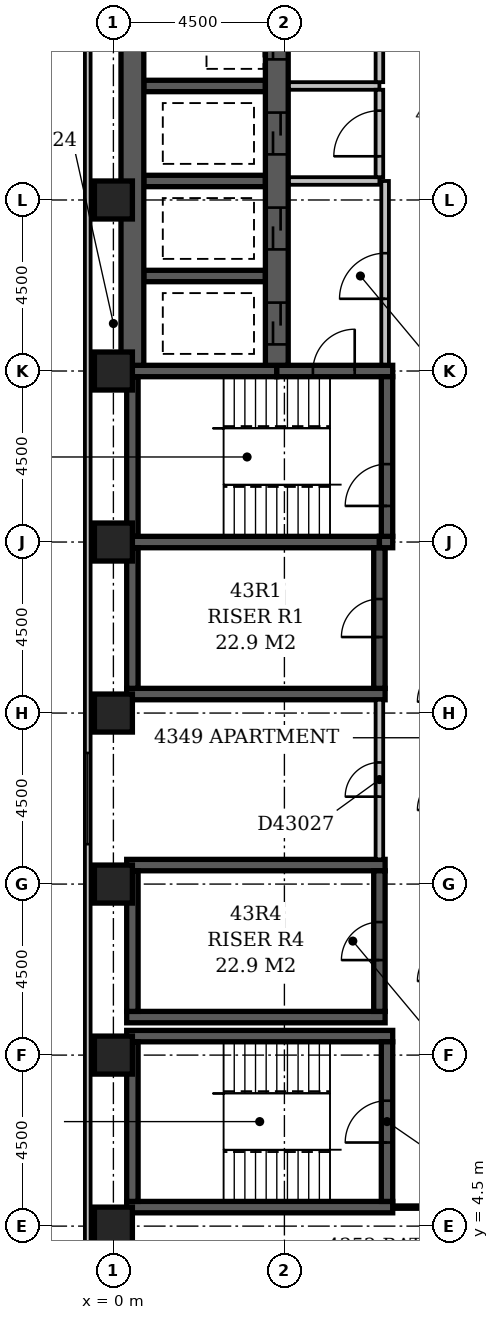
"""IFC4 building model, lengths in metres.
Left out: names, types, materials, properties, quantities, classifications, styles, units other than length and angle.
Written with IfcOpenShell. Run it as: python <this file> out.ifc"""

import sys

from ifc_helpers import new_model, si_unit, direction, frame, frame_2d, origin, origin_2d, place, context, subcontext, project, spatial, rectangle, extrude, element, fill, save


model = new_model("IFC4")
c1 = context("Model", 3, precision=1e-05, world=origin(), true_north=direction((0.0, 1.0)))
c2 = subcontext(c1, "Body", "Model", "MODEL_VIEW")
j1 = project(units=[si_unit("LENGTHUNIT", "METRE"), si_unit("PLANEANGLEUNIT", "RADIAN")], contexts=[c1])
p1 = place(None, origin())
s1 = spatial("IfcSite", under=j1, at=p1, CompositionType="ELEMENT")
p2 = place(p1, origin())
s2 = spatial("IfcBuilding", under=s1, at=p2, CompositionType="ELEMENT")
p3 = place(p2, frame((0.0, 0.0, 170.0)))
s3 = spatial("IfcBuildingStorey", under=s2, at=p3, CompositionType="ELEMENT", Elevation=170.0)
for number, where, z_axis, x_axis in (
    (1, (0.35, 5.0, -0.3), (0.0, 0.0, 1.0), (1.0, 0.0, 0.0)),
    (2, (0.35, 9.5, -0.3), (0.0, 0.0, 1.0), (1.0, 0.0, 0.0)),
):
    element("IfcWall", number, at=place(p3, frame(where, z_axis=z_axis, x_axis=x_axis)), inside=s3, PredefinedType="SHEAR", context=c2, shape_type="SweptSolid", body=[
        extrude(rectangle(XDim=7.0, YDim=0.3, at=frame_2d((3.5, 0.0))), origin(), (0.0, 0.0, 1.0), 3.45),
    ])
for number, where, z_axis, x_axis in (
    (3, (0.35, 10.0, -0.3), (0.0, 0.0, 1.0), (1.0, 0.0, 0.0)),
    (4, (0.35, 14.0, -0.3), (0.0, 0.0, 1.0), (1.0, 0.0, 0.0)),
    (5, (0.35, 18.5, -0.3), (0.0, 0.0, 1.0), (1.0, 0.0, 0.0)),
):
    element("IfcWall", number, at=place(p3, frame(where, z_axis=z_axis, x_axis=x_axis)), inside=s3, PredefinedType="SHEAR", context=c2, shape_type="SweptSolid", body=[
        extrude(rectangle(XDim=6.8, YDim=0.3, at=frame_2d((3.4, 0.0))), origin(), (0.0, 0.0, 1.0), 3.45),
    ])
p4 = place(p3, frame((0.35, 22.5, -0.3), z_axis=(0.0, 0.0, 1.0), x_axis=(1.0, 0.0, 0.0)))
e6 = element("IfcWall", 6, at=p4, inside=s3, PredefinedType="SHEAR", context=c2, shape_type="SweptSolid", body=[
    extrude(rectangle(XDim=6.65, YDim=0.3, at=frame_2d((3.325, 0.0))), origin(), (0.0, 0.0, 1.0), 3.45),
])
p5 = place(p3, frame((0.35, 27.0, -0.3), z_axis=(0.0, 0.0, 1.0), x_axis=(1.0, 0.0, 0.0)))
e7 = element("IfcWall", 7, at=p5, inside=s3, PredefinedType="SHEAR", context=c2, shape_type="SweptSolid", body=[
    extrude(rectangle(XDim=3.95, YDim=0.3, at=frame_2d((1.975, 0.0))), origin(), (0.0, 0.0, 1.0), 3.45),
])
p6 = place(p3, frame((0.5, 5.15, -0.3), z_axis=(0.0, 0.0, 1.0), x_axis=(0.0, 1.0, 0.0)))
e8 = element("IfcWall", 8, at=p6, inside=s3, PredefinedType="SHEAR", context=c2, shape_type="SweptSolid", body=[
    extrude(rectangle(XDim=4.2, YDim=0.3, at=frame_2d((2.1, 0.0))), origin(), (0.0, 0.0, 1.0), 3.45),
])
for number, where, z_axis, x_axis in (
    (9, (0.5, 10.15, -0.3), (0.0, 0.0, 1.0), (0.0, 1.0, 0.0)),
    (10, (0.5, 18.65, -0.3), (0.0, 0.0, 1.0), (0.0, 1.0, 0.0)),
):
    element("IfcWall", number, at=place(p3, frame(where, z_axis=z_axis, x_axis=x_axis)), inside=s3, PredefinedType="SHEAR", context=c2, shape_type="SweptSolid", body=[
        extrude(rectangle(XDim=3.7, YDim=0.3, at=frame_2d((1.85, 0.0))), origin(), (0.0, 0.0, 1.0), 3.45),
    ])
p7 = place(p3, frame((0.5, 22.65, -0.3), z_axis=(0.0, 0.0, 1.0), x_axis=(0.0, 1.0, 0.0)))
e11 = element("IfcWall", 11, at=p7, inside=s3, PredefinedType="SHEAR", context=c2, shape_type="SweptSolid", body=[
    extrude(rectangle(XDim=4.2, YDim=0.3, at=frame_2d((2.1, 0.0))), origin(), (0.0, 0.0, 1.0), 3.45),
])
p8 = place(p3, frame((0.5, 27.15, -0.3), z_axis=(0.0, 0.0, 1.0), x_axis=(0.0, 1.0, 0.0)))
e12 = element("IfcWall", 12, at=p8, inside=s3, PredefinedType="SHEAR", context=c2, shape_type="SweptSolid", body=[
    extrude(rectangle(XDim=22.05, YDim=0.6, at=frame_2d((11.025, 0.0))), origin(), (0.0, 0.0, 1.0), 3.45),
])
for number, where, z_axis, x_axis in (
    (13, (0.8, 29.5, -0.3), (0.0, 0.0, 1.0), (1.0, 0.0, 0.0)),
    (14, (0.8, 32.0, -0.3), (0.0, 0.0, 1.0), (1.0, 0.0, 0.0)),
    (15, (0.8, 34.5, -0.3), (0.0, 0.0, 1.0), (1.0, 0.0, 0.0)),
):
    element("IfcWall", number, at=place(p3, frame(where, z_axis=z_axis, x_axis=x_axis)), inside=s3, PredefinedType="SHEAR", context=c2, shape_type="SweptSolid", body=[
        extrude(rectangle(XDim=3.2, YDim=0.3, at=frame_2d((1.6, 0.0))), origin(), (0.0, 0.0, 1.0), 3.45),
    ])
p9 = place(p3, frame((4.3, 27.0, -0.3), z_axis=(0.0, 0.0, 1.0), x_axis=(1.0, 0.0, 0.0)))
e16 = element("IfcWall", 16, at=p9, inside=s3, PredefinedType="SHEAR", context=c2, shape_type="SweptSolid", body=[
    extrude(rectangle(XDim=3.05, YDim=0.3, at=frame_2d((1.525, 0.0))), origin(), (0.0, 0.0, 1.0), 3.45),
])
p10 = place(p9, frame((0.95, 0.0, 0.3)))
e17 = element("IfcOpeningElement", 17, at=p10, cuts=e16, PredefinedType="OPENING", context=c2, shape_type="SweptSolid", body=[
    extrude(rectangle(XDim=1.1, YDim=2.1, at=frame_2d((0.55, 1.05))), frame((0.0, 0.162, 0.0), z_axis=(0.0, -1.0, 0.0), x_axis=(1.0, 0.0, 0.0)), (0.0, 0.0, 1.0), 0.324),
])
p11 = place(p3, frame((4.3, 27.15, -0.3), z_axis=(0.0, 0.0, 1.0), x_axis=(0.0, 1.0, 0.0)))
e18 = element("IfcWall", 18, at=p11, inside=s3, PredefinedType="SHEAR", context=c2, shape_type="SweptSolid", body=[
    extrude(rectangle(XDim=22.05, YDim=0.6, at=frame_2d((11.025, 0.0))), origin(), (0.0, 0.0, 1.0), 3.45),
])
p12 = place(p11, frame((3.05, 0.0, 0.3)))
e19 = element("IfcOpeningElement", 19, at=p12, cuts=e18, PredefinedType="OPENING", context=c2, shape_type="SweptSolid", body=[
    extrude(rectangle(XDim=1.1, YDim=2.1, at=frame_2d((0.55, 1.05))), frame((0.0, 0.312, 0.0), z_axis=(0.0, -1.0, 0.0), x_axis=(1.0, 0.0, 0.0)), (0.0, 0.0, 1.0), 0.624),
])
p13 = place(p11, frame((0.55, 0.0, 0.3)))
e20 = element("IfcOpeningElement", 20, at=p13, cuts=e18, PredefinedType="OPENING", context=c2, shape_type="SweptSolid", body=[
    extrude(rectangle(XDim=1.1, YDim=2.1, at=frame_2d((0.55, 1.05))), frame((0.0, 0.312, 0.0), z_axis=(0.0, -1.0, 0.0), x_axis=(1.0, 0.0, 0.0)), (0.0, 0.0, 1.0), 0.624),
])
p14 = place(p11, frame((20.55, 0.0, 0.3)))
e21 = element("IfcOpeningElement", 21, at=p14, cuts=e18, PredefinedType="OPENING", context=c2, shape_type="SweptSolid", body=[
    extrude(rectangle(XDim=1.1, YDim=2.1, at=frame_2d((0.55, 1.05))), frame((0.0, 0.312, 0.0), z_axis=(0.0, -1.0, 0.0), x_axis=(1.0, 0.0, 0.0)), (0.0, 0.0, 1.0), 0.624),
])
p15 = place(p11, frame((18.05, 0.0, 0.3)))
e22 = element("IfcOpeningElement", 22, at=p15, cuts=e18, PredefinedType="OPENING", context=c2, shape_type="SweptSolid", body=[
    extrude(rectangle(XDim=1.1, YDim=2.1, at=frame_2d((0.55, 1.05))), frame((0.0, 0.312, 0.0), z_axis=(0.0, -1.0, 0.0), x_axis=(1.0, 0.0, 0.0)), (0.0, 0.0, 1.0), 0.624),
])
p16 = place(p11, frame((15.55, 0.0, 0.3)))
e23 = element("IfcOpeningElement", 23, at=p16, cuts=e18, PredefinedType="OPENING", context=c2, shape_type="SweptSolid", body=[
    extrude(rectangle(XDim=1.1, YDim=2.1, at=frame_2d((0.55, 1.05))), frame((0.0, 0.312, 0.0), z_axis=(0.0, -1.0, 0.0), x_axis=(1.0, 0.0, 0.0)), (0.0, 0.0, 1.0), 0.624),
])
p17 = place(p11, frame((13.05, 0.0, 0.3)))
e24 = element("IfcOpeningElement", 24, at=p17, cuts=e18, PredefinedType="OPENING", context=c2, shape_type="SweptSolid", body=[
    extrude(rectangle(XDim=1.1, YDim=2.1, at=frame_2d((0.55, 1.05))), frame((0.0, 0.312, 0.0), z_axis=(0.0, -1.0, 0.0), x_axis=(1.0, 0.0, 0.0)), (0.0, 0.0, 1.0), 0.624),
])
p18 = place(p11, frame((10.55, 0.0, 0.3)))
e25 = element("IfcOpeningElement", 25, at=p18, cuts=e18, PredefinedType="OPENING", context=c2, shape_type="SweptSolid", body=[
    extrude(rectangle(XDim=1.1, YDim=2.1, at=frame_2d((0.55, 1.05))), frame((0.0, 0.312, 0.0), z_axis=(0.0, -1.0, 0.0), x_axis=(1.0, 0.0, 0.0)), (0.0, 0.0, 1.0), 0.624),
])
p19 = place(p11, frame((8.05, 0.0, 0.3)))
e26 = element("IfcOpeningElement", 26, at=p19, cuts=e18, PredefinedType="OPENING", context=c2, shape_type="SweptSolid", body=[
    extrude(rectangle(XDim=1.1, YDim=2.1, at=frame_2d((0.55, 1.05))), frame((0.0, 0.312, 0.0), z_axis=(0.0, -1.0, 0.0), x_axis=(1.0, 0.0, 0.0)), (0.0, 0.0, 1.0), 0.624),
])
p20 = place(p11, frame((5.55, 0.0, 0.3)))
e27 = element("IfcOpeningElement", 27, at=p20, cuts=e18, PredefinedType="OPENING", context=c2, shape_type="SweptSolid", body=[
    extrude(rectangle(XDim=1.1, YDim=2.1, at=frame_2d((0.55, 1.05))), frame((0.0, 0.312, 0.0), z_axis=(0.0, -1.0, 0.0), x_axis=(1.0, 0.0, 0.0)), (0.0, 0.0, 1.0), 0.624),
])
p21 = place(p3, frame((7.0, 10.15, -0.3), z_axis=(0.0, 0.0, 1.0), x_axis=(0.0, 1.0, 0.0)))
e28 = element("IfcWall", 28, at=p21, inside=s3, PredefinedType="SHEAR", context=c2, shape_type="SweptSolid", body=[
    extrude(rectangle(XDim=3.7, YDim=0.3, at=frame_2d((1.85, 0.0))), origin(), (0.0, 0.0, 1.0), 3.45),
])
p22 = place(p21, frame((1.35, 0.0, 0.3)))
e29 = element("IfcOpeningElement", 29, at=p22, cuts=e28, PredefinedType="OPENING", context=c2, shape_type="SweptSolid", body=[
    extrude(rectangle(XDim=1.0, YDim=2.1, at=frame_2d((0.5, 1.05))), frame((0.0, 0.162, 0.0), z_axis=(0.0, -1.0, 0.0), x_axis=(1.0, 0.0, 0.0)), (0.0, 0.0, 1.0), 0.324),
])
p23 = place(p3, frame((7.0, 18.65, -0.3), z_axis=(0.0, 0.0, 1.0), x_axis=(0.0, 1.0, 0.0)))
e30 = element("IfcWall", 30, at=p23, inside=s3, PredefinedType="SHEAR", context=c2, shape_type="SweptSolid", body=[
    extrude(rectangle(XDim=3.7, YDim=0.3, at=frame_2d((1.85, 0.0))), origin(), (0.0, 0.0, 1.0), 3.45),
])
p24 = place(p23, frame((1.35, 0.0, 0.3)))
e31 = element("IfcOpeningElement", 31, at=p24, cuts=e30, PredefinedType="OPENING", context=c2, shape_type="SweptSolid", body=[
    extrude(rectangle(XDim=1.0, YDim=2.1, at=frame_2d((0.5, 1.05))), frame((0.0, 0.162, 0.0), z_axis=(0.0, -1.0, 0.0), x_axis=(1.0, 0.0, 0.0)), (0.0, 0.0, 1.0), 0.324),
])
p25 = place(p3, frame((7.0, 22.5, -0.3), z_axis=(0.0, 0.0, 1.0), x_axis=(1.0, 0.0, 0.0)))
e32 = element("IfcWall", 32, at=p25, inside=s3, PredefinedType="SHEAR", context=c2, shape_type="SweptSolid", body=[
    extrude(rectangle(XDim=0.35, YDim=0.3, at=frame_2d((0.175, 0.0))), origin(), (0.0, 0.0, 1.0), 3.45),
])
p26 = place(p3, frame((7.2, 5.15, -0.3), z_axis=(0.0, 0.0, 1.0), x_axis=(0.0, 1.0, 0.0)))
e33 = element("IfcWall", 33, at=p26, inside=s3, PredefinedType="SHEAR", context=c2, shape_type="SweptSolid", body=[
    extrude(rectangle(XDim=4.2, YDim=0.3, at=frame_2d((2.1, 0.0))), origin(), (0.0, 0.0, 1.0), 3.45),
])
p27 = place(p26, frame((1.55, 0.0, 0.3)))
e34 = element("IfcOpeningElement", 34, at=p27, cuts=e33, PredefinedType="OPENING", context=c2, shape_type="SweptSolid", body=[
    extrude(rectangle(XDim=1.1, YDim=2.1, at=frame_2d((0.55, 1.05))), frame((0.0, 0.162, 0.0), z_axis=(0.0, -1.0, 0.0), x_axis=(1.0, 0.0, 0.0)), (0.0, 0.0, 1.0), 0.324),
])
p28 = place(p3, frame((7.2, 22.65, -0.3), z_axis=(0.0, 0.0, 1.0), x_axis=(0.0, 1.0, 0.0)))
e35 = element("IfcWall", 35, at=p28, inside=s3, PredefinedType="SHEAR", context=c2, shape_type="SweptSolid", body=[
    extrude(rectangle(XDim=4.2, YDim=0.3, at=frame_2d((2.1, 0.0))), origin(), (0.0, 0.0, 1.0), 3.45),
])
p29 = place(p28, frame((0.8, 0.0, 0.3)))
e36 = element("IfcOpeningElement", 36, at=p29, cuts=e35, PredefinedType="OPENING", context=c2, shape_type="SweptSolid", body=[
    extrude(rectangle(XDim=1.1, YDim=2.1, at=frame_2d((0.55, 1.05))), frame((0.0, 0.162, 0.0), z_axis=(0.0, -1.0, 0.0), x_axis=(1.0, 0.0, 0.0)), (0.0, 0.0, 1.0), 0.324),
])
for number, where, z_axis, x_axis in (
    (37, (0.0, 4.5, -0.3), (0.0, 0.0, 1.0), (1.0, 0.0, 0.0)),
    (38, (0.0, 9.0, -0.3), (0.0, 0.0, 1.0), (1.0, 0.0, 0.0)),
    (39, (0.0, 13.5, -0.3), (0.0, 0.0, 1.0), (1.0, 0.0, 0.0)),
    (40, (0.0, 18.0, -0.3), (0.0, 0.0, 1.0), (1.0, 0.0, 0.0)),
    (41, (0.0, 22.5, -0.3), (0.0, 0.0, 1.0), (1.0, 0.0, 0.0)),
    (42, (0.0, 27.0, -0.3), (0.0, 0.0, 1.0), (1.0, 0.0, 0.0)),
    (43, (0.0, 31.5, -0.3), (0.0, 0.0, 1.0), (1.0, 0.0, 0.0)),
):
    element("IfcColumn", number, at=place(p3, frame(where, z_axis=z_axis, x_axis=x_axis)), inside=s3, PredefinedType="COLUMN", context=c2, shape_type="SweptSolid", body=[
        extrude(rectangle(XDim=1.0, YDim=1.0, at=origin_2d()), origin(), (0.0, 0.0, 1.0), 3.45),
    ])
p30 = place(p3, frame((-0.675, 59.1, 0.0), z_axis=(0.0, 0.0, 1.0), x_axis=(0.0, -1.0, 0.0)))
e44 = element("IfcWall", 44, at=p30, inside=s3, PredefinedType="STANDARD", context=c2, shape_type="SweptSolid", body=[
    extrude(rectangle(XDim=55.35, YDim=0.15, at=frame_2d((27.675, 0.0))), origin(), (0.0, 0.0, 1.0), 2.5),
])
p31 = place(p30, frame((42.15, 0.0, 0.6)))
e45 = element("IfcOpeningElement", 45, at=p31, cuts=e44, PredefinedType="OPENING", context=c2, shape_type="SweptSolid", body=[
    extrude(rectangle(XDim=2.4, YDim=1.8, at=frame_2d((1.2, 0.9))), frame((0.0, 0.087, 0.0), z_axis=(0.0, -1.0, 0.0), x_axis=(1.0, 0.0, 0.0)), (0.0, 0.0, 1.0), 0.174),
])
p32 = place(p3, frame((4.62, 34.5, 0.0), z_axis=(0.0, 0.0, 1.0), x_axis=(1.0, 0.0, 0.0)))
e46 = element("IfcWall", 46, at=p32, inside=s3, PredefinedType="PARTITIONING", context=c2, shape_type="SweptSolid", body=[
    extrude(rectangle(XDim=2.38, YDim=0.2, at=frame_2d((1.19, 0.0))), origin(), (0.0, 0.0, 1.0), 3.15),
])
p33 = place(p3, frame((7.0, 34.6, 0.0), z_axis=(0.0, 0.0, 1.0), x_axis=(0.0, 1.0, 0.0)))
e47 = element("IfcWall", 47, at=p33, inside=s3, PredefinedType="PARTITIONING", context=c2, shape_type="SweptSolid", body=[
    extrude(rectangle(XDim=14.9, YDim=0.2, at=frame_2d((7.45, 0.0))), origin(), (0.0, 0.0, 1.0), 3.15),
])
p34 = place(p33, frame((2.8, 0.0, 0.0)))
e48 = element("IfcOpeningElement", 48, at=p34, cuts=e47, PredefinedType="OPENING", context=c2, shape_type="SweptSolid", body=[
    extrude(rectangle(XDim=1.2, YDim=2.1, at=frame_2d((0.6, 1.05))), frame((0.0, 0.112, 0.0), z_axis=(0.0, -1.0, 0.0), x_axis=(1.0, 0.0, 0.0)), (0.0, 0.0, 1.0), 0.224),
])
p35 = place(p33, frame((9.8, 0.0, 0.0)))
e49 = element("IfcOpeningElement", 49, at=p35, cuts=e47, PredefinedType="OPENING", context=c2, shape_type="SweptSolid", body=[
    extrude(rectangle(XDim=1.2, YDim=2.1, at=frame_2d((0.6, 1.05))), frame((0.0, 0.112, 0.0), z_axis=(0.0, -1.0, 0.0), x_axis=(1.0, 0.0, 0.0)), (0.0, 0.0, 1.0), 0.224),
])
p36 = place(p3, frame((4.62, 32.0, 0.0), z_axis=(0.0, 0.0, 1.0), x_axis=(1.0, 0.0, 0.0)))
e50 = element("IfcWall", 50, at=p36, inside=s3, PredefinedType="PARTITIONING", context=c2, shape_type="SweptSolid", body=[
    extrude(rectangle(XDim=2.38, YDim=0.2, at=frame_2d((1.19, 0.0))), origin(), (0.0, 0.0, 1.0), 3.15),
])
p37 = place(p3, frame((7.0, 32.1, 0.0), z_axis=(0.0, 0.0, 1.0), x_axis=(0.0, 1.0, 0.0)))
e51 = element("IfcWall", 51, at=p37, inside=s3, PredefinedType="PARTITIONING", context=c2, shape_type="SweptSolid", body=[
    extrude(rectangle(XDim=2.3, YDim=0.2, at=frame_2d((1.15, 0.0))), origin(), (0.0, 0.0, 1.0), 3.15),
])
p38 = place(p37, frame((0.55, 0.0, 0.0)))
e52 = element("IfcOpeningElement", 52, at=p38, cuts=e51, PredefinedType="OPENING", context=c2, shape_type="SweptSolid", body=[
    extrude(rectangle(XDim=1.2, YDim=2.1, at=frame_2d((0.6, 1.05))), frame((0.0, 0.112, 0.0), z_axis=(0.0, -1.0, 0.0), x_axis=(1.0, 0.0, 0.0)), (0.0, 0.0, 1.0), 0.224),
])
p39 = place(p3, frame((7.15, 27.17, 0.0), z_axis=(0.0, 0.0, 1.0), x_axis=(0.0, 1.0, 0.0)))
e53 = element("IfcWall", 53, at=p39, inside=s3, PredefinedType="PARTITIONING", context=c2, shape_type="SweptSolid", body=[
    extrude(rectangle(XDim=4.83, YDim=0.2, at=frame_2d((2.415, 0.0))), origin(), (0.0, 0.0, 1.0), 3.15),
])
p40 = place(p39, frame((1.73, 0.0, 0.0)))
e54 = element("IfcOpeningElement", 54, at=p40, cuts=e53, PredefinedType="OPENING", context=c2, shape_type="SweptSolid", body=[
    extrude(rectangle(XDim=1.2, YDim=2.1, at=frame_2d((0.6, 1.05))), frame((0.0, 0.112, 0.0), z_axis=(0.0, -1.0, 0.0), x_axis=(1.0, 0.0, 0.0)), (0.0, 0.0, 1.0), 0.224),
])
p41 = place(p3, frame((0.0, 4.5, 0.0), z_axis=(0.0, 0.0, 1.0), x_axis=(0.0, 1.0, 0.0)))
e55 = element("IfcWall", 55, at=p41, inside=s3, PredefinedType="PARTITIONING", context=c2, shape_type="SweptSolid", body=[
    extrude(rectangle(XDim=0.5, YDim=0.1, at=frame_2d((0.25, 0.0))), origin(), (0.0, 0.0, 1.0), 2.5),
])
p42 = place(p3, frame((7.349, 5.0, 0.0), z_axis=(0.0, 0.0, 1.0), x_axis=(1.0, 0.0, 0.0)))
e56 = element("IfcWall", 56, at=p42, inside=s3, PredefinedType="PARTITIONING", context=c2, shape_type="SweptSolid", body=[
    extrude(rectangle(XDim=1.551, YDim=0.1, at=frame_2d((0.775, 0.0))), origin(), (0.0, 0.0, 1.0), 3.15),
])
p43 = place(p3, frame((7.0, 14.15, 0.0), z_axis=(0.0, 0.0, 1.0), x_axis=(0.0, 1.0, 0.0)))
e57 = element("IfcWall", 57, at=p43, inside=s3, PredefinedType="PARTITIONING", context=c2, shape_type="SweptSolid", body=[
    extrude(rectangle(XDim=4.2, YDim=0.2, at=frame_2d((2.1, 0.0))), origin(), (0.0, 0.0, 1.0), 3.15),
])
p44 = place(p43, frame((1.65, 0.0, 0.0)))
e58 = element("IfcOpeningElement", 58, at=p44, cuts=e57, PredefinedType="OPENING", context=c2, shape_type="SweptSolid", body=[
    extrude(rectangle(XDim=0.9, YDim=2.1, at=frame_2d((0.45, 1.05))), frame((0.0, 0.112, 0.0), z_axis=(0.0, -1.0, 0.0), x_axis=(1.0, 0.0, 0.0)), (0.0, 0.0, 1.0), 0.224),
])
p45 = place(p31, origin())
e59 = element("IfcWindow", 59, at=p45, inside=s3, PartitioningType="SINGLE_PANEL", PredefinedType="WINDOW", context=c2, shape_type="SweptSolid", body=[
    extrude(rectangle(XDim=2.4, YDim=1.8, at=frame_2d((1.2, 0.9))), frame((0.0, 0.03, 0.0), z_axis=(0.0, -1.0, 0.0), x_axis=(1.0, 0.0, 0.0)), (0.0, 0.0, 1.0), 0.06),
])
fill(e45, e59)
p46 = place(p40, origin())
e60 = element("IfcDoor", 60, at=p46, inside=s3, OperationType="SINGLE_SWING_LEFT", PredefinedType="DOOR", context=c2, shape_type="SweptSolid", body=[
    extrude(rectangle(XDim=1.2, YDim=2.1, at=frame_2d((0.6, 1.05))), frame((0.0, 0.025, 0.0), z_axis=(0.0, -1.0, 0.0), x_axis=(1.0, 0.0, 0.0)), (0.0, 0.0, 1.0), 0.05),
])
fill(e54, e60)
p47 = place(p12, origin())
e61 = element("IfcDoor", 61, at=p47, inside=s3, OperationType="SLIDING_TO_LEFT", PredefinedType="DOOR", context=c2, shape_type="SweptSolid", body=[
    extrude(rectangle(XDim=1.1, YDim=2.1, at=frame_2d((0.55, 1.05))), frame((0.0, 0.025, 0.0), z_axis=(0.0, -1.0, 0.0), x_axis=(1.0, 0.0, 0.0)), (0.0, 0.0, 1.0), 0.05),
])
fill(e19, e61)
p48 = place(p13, origin())
e62 = element("IfcDoor", 62, at=p48, inside=s3, OperationType="SLIDING_TO_LEFT", PredefinedType="DOOR", context=c2, shape_type="SweptSolid", body=[
    extrude(rectangle(XDim=1.1, YDim=2.1, at=frame_2d((0.55, 1.05))), frame((0.0, 0.025, 0.0), z_axis=(0.0, -1.0, 0.0), x_axis=(1.0, 0.0, 0.0)), (0.0, 0.0, 1.0), 0.05),
])
fill(e20, e62)
p49 = place(p19, origin())
e63 = element("IfcDoor", 63, at=p49, inside=s3, OperationType="SLIDING_TO_LEFT", PredefinedType="DOOR", context=c2, shape_type="SweptSolid", body=[
    extrude(rectangle(XDim=1.1, YDim=2.1, at=frame_2d((0.55, 1.05))), frame((0.0, 0.025, 0.0), z_axis=(0.0, -1.0, 0.0), x_axis=(1.0, 0.0, 0.0)), (0.0, 0.0, 1.0), 0.05),
])
fill(e26, e63)
p50 = place(p38, origin())
e64 = element("IfcDoor", 64, at=p50, inside=s3, OperationType="SINGLE_SWING_LEFT", PredefinedType="DOOR", context=c2, shape_type="SweptSolid", body=[
    extrude(rectangle(XDim=1.2, YDim=2.1, at=frame_2d((0.6, 1.05))), frame((0.0, 0.025, 0.0), z_axis=(0.0, -1.0, 0.0), x_axis=(1.0, 0.0, 0.0)), (0.0, 0.0, 1.0), 0.05),
])
fill(e52, e64)
p51 = place(p20, origin())
e65 = element("IfcDoor", 65, at=p51, inside=s3, OperationType="SLIDING_TO_LEFT", PredefinedType="DOOR", context=c2, shape_type="SweptSolid", body=[
    extrude(rectangle(XDim=1.1, YDim=2.1, at=frame_2d((0.55, 1.05))), frame((0.0, 0.025, 0.0), z_axis=(0.0, -1.0, 0.0), x_axis=(1.0, 0.0, 0.0)), (0.0, 0.0, 1.0), 0.05),
])
fill(e27, e65)
p52 = place(p24, origin())
e66 = element("IfcDoor", 66, at=p52, inside=s3, OperationType="SINGLE_SWING_LEFT", PredefinedType="DOOR", context=c2, shape_type="SweptSolid", body=[
    extrude(rectangle(XDim=1.0, YDim=2.1, at=frame_2d((0.5, 1.05))), frame((0.0, 0.025, 0.0), z_axis=(0.0, -1.0, 0.0), x_axis=(1.0, 0.0, 0.0)), (0.0, 0.0, 1.0), 0.05),
])
fill(e31, e66)
p53 = place(p22, origin())
e67 = element("IfcDoor", 67, at=p53, inside=s3, OperationType="SINGLE_SWING_LEFT", PredefinedType="DOOR", context=c2, shape_type="SweptSolid", body=[
    extrude(rectangle(XDim=1.0, YDim=2.1, at=frame_2d((0.5, 1.05))), frame((0.0, 0.025, 0.0), z_axis=(0.0, -1.0, 0.0), x_axis=(1.0, 0.0, 0.0)), (0.0, 0.0, 1.0), 0.05),
])
fill(e29, e67)
p54 = place(p10, frame((1.1, 0.0, 0.0), z_axis=(0.0, 0.0, 1.0), x_axis=(-1.0, 0.0, 0.0)))
e68 = element("IfcDoor", 68, at=p54, inside=s3, OperationType="SINGLE_SWING_LEFT", PredefinedType="DOOR", context=c2, shape_type="SweptSolid", body=[
    extrude(rectangle(XDim=1.1, YDim=2.1, at=frame_2d((0.55, 1.05))), frame((0.0, 0.025, 0.0), z_axis=(0.0, -1.0, 0.0), x_axis=(1.0, 0.0, 0.0)), (0.0, 0.0, 1.0), 0.05),
])
fill(e17, e68)
p55 = place(p29, origin())
e69 = element("IfcDoor", 69, at=p55, inside=s3, OperationType="SINGLE_SWING_LEFT", PredefinedType="DOOR", context=c2, shape_type="SweptSolid", body=[
    extrude(rectangle(XDim=1.1, YDim=2.1, at=frame_2d((0.55, 1.05))), frame((0.0, 0.025, 0.0), z_axis=(0.0, -1.0, 0.0), x_axis=(1.0, 0.0, 0.0)), (0.0, 0.0, 1.0), 0.05),
])
fill(e36, e69)
p56 = place(p27, origin())
e70 = element("IfcDoor", 70, at=p56, inside=s3, OperationType="SINGLE_SWING_LEFT", PredefinedType="DOOR", context=c2, shape_type="SweptSolid", body=[
    extrude(rectangle(XDim=1.1, YDim=2.1, at=frame_2d((0.55, 1.05))), frame((0.0, 0.025, 0.0), z_axis=(0.0, -1.0, 0.0), x_axis=(1.0, 0.0, 0.0)), (0.0, 0.0, 1.0), 0.05),
])
fill(e34, e70)
p57 = place(p44, origin())
e71 = element("IfcDoor", 71, at=p57, inside=s3, OperationType="SINGLE_SWING_LEFT", PredefinedType="DOOR", context=c2, shape_type="SweptSolid", body=[
    extrude(rectangle(XDim=0.9, YDim=2.1, at=frame_2d((0.45, 1.05))), frame((0.0, 0.025, 0.0), z_axis=(0.0, -1.0, 0.0), x_axis=(1.0, 0.0, 0.0)), (0.0, 0.0, 1.0), 0.05),
])
fill(e58, e71)
save(model, sys.argv[1])
